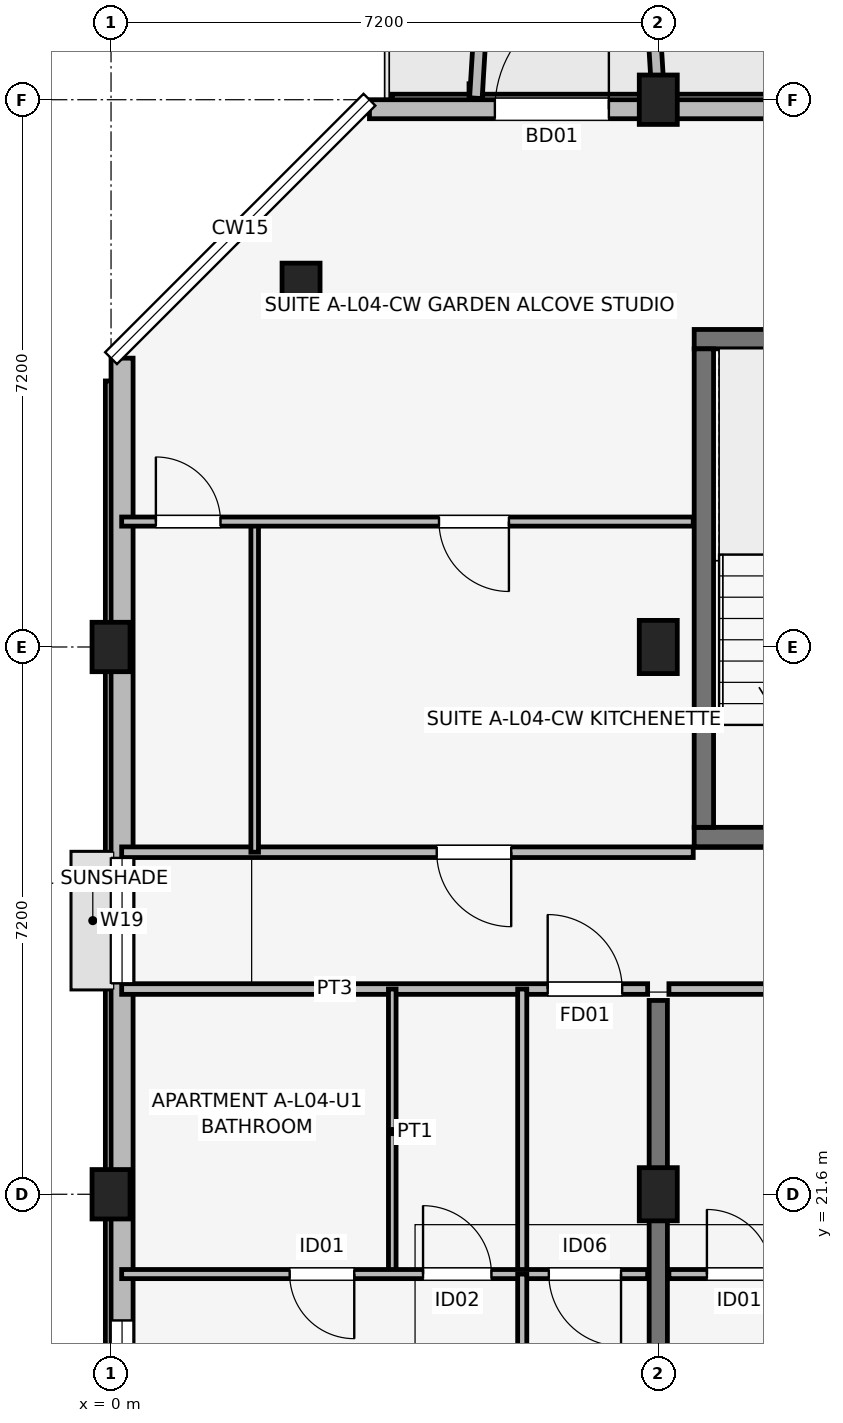
"""IFC4 building model, lengths in metres.
Left out: names, types, materials, properties, quantities, classifications, styles, units other than length and angle.
Written with IfcOpenShell. Run it as: python <this file> out.ifc"""

import sys

from ifc_helpers import new_model, si_unit, direction, frame, frame_2d, origin, origin_2d, place, context, subcontext, project, spatial, rectangle, extrude, element, fill, save


model = new_model("IFC4")
c1 = context("Model", 3, precision=1e-05, world=origin(), true_north=direction((0.0, 1.0)))
c2 = subcontext(c1, "Body", "Model", "MODEL_VIEW")
j1 = project(units=[si_unit("LENGTHUNIT", "METRE"), si_unit("PLANEANGLEUNIT", "RADIAN")], contexts=[c1])
p1 = place(None, origin())
s1 = spatial("IfcSite", under=j1, at=p1, CompositionType="ELEMENT")
p2 = place(p1, origin())
s2 = spatial("IfcBuilding", under=s1, at=p2, CompositionType="ELEMENT")
p3 = place(p2, frame((0.0, 0.0, 15.0)))
s3 = spatial("IfcBuildingStorey", under=s2, at=p3, CompositionType="ELEMENT", Elevation=15.0)
for number, where, z_axis, x_axis in (
    (1, (0.0, 21.6, 0.0), (0.0, 0.0, 1.0), (1.0, 0.0, 0.0)),
    (2, (0.0, 28.8, 0.0), (0.0, 0.0, 1.0), (1.0, 0.0, 0.0)),
):
    element("IfcColumn", number, at=place(p3, frame(where, z_axis=z_axis, x_axis=x_axis)), inside=s3, PredefinedType="COLUMN", context=c2, shape_type="SweptSolid", body=[
        extrude(rectangle(XDim=0.5, YDim=0.65, at=origin_2d()), origin(), (0.0, 0.0, 1.0), 3.15),
    ])
for number, where, z_axis, x_axis in (
    (3, (2.5, 33.5, 0.0), (0.0, 0.0, 1.0), (1.0, 0.0, 0.0)),
    (4, (7.2, 21.6, 0.0), (0.0, 0.0, 1.0), (1.0, 0.0, 0.0)),
    (5, (7.2, 28.8, 0.0), (0.0, 0.0, 1.0), (1.0, 0.0, 0.0)),
):
    element("IfcColumn", number, at=place(p3, frame(where, z_axis=z_axis, x_axis=x_axis)), inside=s3, PredefinedType="COLUMN", context=c2, shape_type="SweptSolid", body=[
        extrude(rectangle(XDim=0.5, YDim=0.7, at=origin_2d()), origin(), (0.0, 0.0, 1.0), 3.15),
    ])
p4 = place(p3, frame((7.2, 36.0, 0.0), z_axis=(0.0, 0.0, 1.0), x_axis=(1.0, 0.0, 0.0)))
e6 = element("IfcColumn", 6, at=p4, inside=s3, PredefinedType="COLUMN", context=c2, shape_type="SweptSolid", body=[
    extrude(rectangle(XDim=0.5, YDim=0.65, at=origin_2d()), origin(), (0.0, 0.0, 1.0), 3.15),
])
p5 = place(p3, frame((7.673, 26.3, 0.0), z_axis=(0.0, 0.0, 1.0), x_axis=(1.0, 0.0, 0.0)))
e7 = element("IfcWall", 7, at=p5, inside=s3, PredefinedType="SHEAR", context=c2, shape_type="SweptSolid", body=[
    extrude(rectangle(XDim=3.305, YDim=0.255, at=frame_2d((1.652, 0.0))), origin(), (0.0, 0.0, 1.0), 3.15),
])
p6 = place(p5, frame((2.177, 0.0, 0.0), z_axis=(0.0, 0.0, 1.0), x_axis=(-1.0, 0.0, 0.0)))
e8 = element("IfcOpeningElement", 8, at=p6, cuts=e7, PredefinedType="OPENING", context=c2, shape_type="SweptSolid", body=[
    extrude(rectangle(XDim=1.05, YDim=2.12, at=frame_2d((0.525, 1.06))), frame((0.0, 0.137, 0.0), z_axis=(0.0, -1.0, 0.0), x_axis=(1.0, 0.0, 0.0)), (0.0, 0.0, 1.0), 0.275),
])
p7 = place(p3, frame((7.673, 32.85, 0.0), z_axis=(0.0, 0.0, 1.0), x_axis=(1.0, 0.0, 0.0)))
e9 = element("IfcWall", 9, at=p7, inside=s3, PredefinedType="SHEAR", context=c2, shape_type="SweptSolid", body=[
    extrude(rectangle(XDim=3.305, YDim=0.255, at=frame_2d((1.652, 0.0))), origin(), (0.0, 0.0, 1.0), 3.15),
])
p8 = place(p3, frame((7.8, 26.427, 0.0), z_axis=(0.0, 0.0, 1.0), x_axis=(0.0, 1.0, 0.0)))
e10 = element("IfcWall", 10, at=p8, inside=s3, PredefinedType="SHEAR", context=c2, shape_type="SweptSolid", body=[
    extrude(rectangle(XDim=6.295, YDim=0.255, at=frame_2d((3.147, 0.0))), origin(), (0.0, 0.0, 1.0), 3.15),
])
p9 = place(p3, frame((7.2, 14.75, 0.0), z_axis=(0.0, 0.0, 1.0), x_axis=(0.0, 1.0, 0.0)))
e11 = element("IfcWall", 11, at=p9, inside=s3, PredefinedType="SHEAR", context=c2, shape_type="SweptSolid", body=[
    extrude(rectangle(XDim=9.4, YDim=0.24, at=frame_2d((4.7, 0.0))), origin(), (0.0, 0.0, 1.0), 3.15),
])
p10 = place(p3, frame((32.6, 35.875, 0.0), z_axis=(0.0, 0.0, 1.0), x_axis=(-1.0, 0.0, 0.0)))
e12 = element("IfcWall", 12, at=p10, inside=s3, PredefinedType="SOLIDWALL", context=c2, shape_type="SweptSolid", body=[
    extrude(rectangle(XDim=29.2, YDim=0.25, at=frame_2d((14.6, 0.0))), origin(), (0.0, 0.0, 1.0), 2.43),
])
p11 = place(p10, frame((27.55, 0.0, 0.0), z_axis=(0.0, 0.0, 1.0), x_axis=(-1.0, 0.0, 0.0)))
e13 = element("IfcOpeningElement", 13, at=p11, cuts=e12, PredefinedType="OPENING", context=c2, shape_type="SweptSolid", body=[
    extrude(rectangle(XDim=1.5, YDim=2.15, at=frame_2d((0.75, 1.075))), frame((0.0, 0.135, 0.0), z_axis=(0.0, -1.0, 0.0), x_axis=(1.0, 0.0, 0.0)), (0.0, 0.0, 1.0), 0.27),
])
p12 = place(p10, frame((3.15, 0.0, 0.0), z_axis=(0.0, 0.0, 1.0), x_axis=(-1.0, 0.0, 0.0)))
e14 = element("IfcOpeningElement", 14, at=p12, cuts=e12, PredefinedType="OPENING", context=c2, shape_type="SweptSolid", body=[
    extrude(rectangle(XDim=1.5, YDim=2.15, at=frame_2d((0.75, 1.075))), frame((0.0, 0.135, 0.0), z_axis=(0.0, -1.0, 0.0), x_axis=(1.0, 0.0, 0.0)), (0.0, 0.0, 1.0), 0.27),
])
p13 = place(p10, frame((14.15, 0.0, 0.5)))
e15 = element("IfcOpeningElement", 15, at=p13, cuts=e12, PredefinedType="OPENING", context=c2, shape_type="SweptSolid", body=[
    extrude(rectangle(XDim=0.9, YDim=1.8, at=frame_2d((0.45, 0.9))), frame((0.0, 0.135, 0.0), z_axis=(0.0, -1.0, 0.0), x_axis=(1.0, 0.0, 0.0)), (0.0, 0.0, 1.0), 0.27),
])
p14 = place(p10, frame((8.725, 0.0, 0.7)))
e16 = element("IfcOpeningElement", 16, at=p14, cuts=e12, PredefinedType="OPENING", context=c2, shape_type="SweptSolid", body=[
    extrude(rectangle(XDim=1.86, YDim=1.6, at=frame_2d((0.93, 0.8))), frame((0.0, 0.135, 0.0), z_axis=(0.0, -1.0, 0.0), x_axis=(1.0, 0.0, 0.0)), (0.0, 0.0, 1.0), 0.27),
])
p15 = place(p10, frame((18.755, 0.0, 0.7)))
e17 = element("IfcOpeningElement", 17, at=p15, cuts=e12, PredefinedType="OPENING", context=c2, shape_type="SweptSolid", body=[
    extrude(rectangle(XDim=1.58, YDim=1.6, at=frame_2d((0.79, 0.8))), frame((0.0, 0.135, 0.0), z_axis=(0.0, -1.0, 0.0), x_axis=(1.0, 0.0, 0.0)), (0.0, 0.0, 1.0), 0.27),
])
p16 = place(p3, frame((0.145, 32.6, 0.0), z_axis=(0.0, 0.0, 1.0), x_axis=(0.0, -1.0, 0.0)))
e18 = element("IfcWall", 18, at=p16, inside=s3, PredefinedType="SOLIDWALL", context=c2, shape_type="SweptSolid", body=[
    extrude(rectangle(XDim=14.8, YDim=0.29, at=frame_2d((7.4, 0.0))), origin(), (0.0, 0.0, 1.0), 2.38),
])
p17 = place(p16, frame((6.575, 0.0, 1.05)))
e19 = element("IfcOpeningElement", 19, at=p17, cuts=e18, PredefinedType="OPENING", context=c2, shape_type="SweptSolid", body=[
    extrude(rectangle(XDim=1.65, YDim=1.15, at=frame_2d((0.825, 0.575))), frame((0.0, 0.155, 0.0), z_axis=(0.0, -1.0, 0.0), x_axis=(1.0, 0.0, 0.0)), (0.0, 0.0, 1.0), 0.31),
])
p18 = place(p16, frame((12.66, 0.0, 0.72)))
e20 = element("IfcOpeningElement", 20, at=p18, cuts=e18, PredefinedType="OPENING", context=c2, shape_type="SweptSolid", body=[
    extrude(rectangle(XDim=1.3, YDim=1.55, at=frame_2d((0.65, 0.775))), frame((0.0, 0.155, 0.0), z_axis=(0.0, -1.0, 0.0), x_axis=(1.0, 0.0, 0.0)), (0.0, 0.0, 1.0), 0.31),
])
for number, where, z_axis, x_axis in (
    (21, (4.8, 36.02, 0.0), (0.0, 0.0, 1.0), (0.061, 0.998, 0.0)),
    (22, (7.2, 36.02, 0.0), (0.0, 0.0, 1.0), (-0.061, 0.998, 0.0)),
):
    element("IfcWall", number, at=place(p3, frame(where, z_axis=z_axis, x_axis=x_axis)), inside=s3, PredefinedType="ELEMENTEDWALL", context=c2, shape_type="SweptSolid", body=[
        extrude(rectangle(XDim=1.964, YDim=0.165, at=frame_2d((0.982, 0.0))), origin(), (0.0, 0.0, 1.0), 2.95),
    ])
p19 = place(p3, frame((0.14, 24.3, 0.0), z_axis=(0.0, 0.0, 1.0), x_axis=(1.0, 0.0, 0.0)))
e23 = element("IfcWall", 23, at=p19, inside=s3, PredefinedType="PARTITIONING", context=c2, shape_type="SweptSolid", body=[
    extrude(rectangle(XDim=6.92, YDim=0.14, at=frame_2d((3.46, 0.0))), origin(), (0.0, 0.0, 1.0), 2.38),
])
p20 = place(p19, frame((5.605, 0.0, 0.0)))
e24 = element("IfcOpeningElement", 24, at=p20, cuts=e23, PredefinedType="OPENING", context=c2, shape_type="SweptSolid", body=[
    extrude(rectangle(XDim=0.98, YDim=2.1, at=frame_2d((0.49, 1.05))), frame((0.0, 0.08, 0.0), z_axis=(0.0, -1.0, 0.0), x_axis=(1.0, 0.0, 0.0)), (0.0, 0.0, 1.0), 0.16),
])
p21 = place(p3, frame((3.7, 20.55, 0.0), z_axis=(0.0, 0.0, 1.0), x_axis=(0.0, 1.0, 0.0)))
e25 = element("IfcWall", 25, at=p21, inside=s3, PredefinedType="PARTITIONING", context=c2, shape_type="SweptSolid", body=[
    extrude(rectangle(XDim=3.75, YDim=0.1, at=frame_2d((1.875, 0.0))), origin(), (0.0, 0.0, 1.0), 2.375),
])
p22 = place(p3, frame((5.41, 20.55, 0.0), z_axis=(0.0, 0.0, 1.0), x_axis=(0.0, 1.0, 0.0)))
e26 = element("IfcWall", 26, at=p22, inside=s3, PredefinedType="PARTITIONING", context=c2, shape_type="SweptSolid", body=[
    extrude(rectangle(XDim=3.75, YDim=0.12, at=frame_2d((1.875, 0.0))), origin(), (0.0, 0.0, 1.0), 2.375),
])
p23 = place(p3, frame((0.14, 20.55, 0.0), z_axis=(0.0, 0.0, 1.0), x_axis=(1.0, 0.0, 0.0)))
e27 = element("IfcWall", 27, at=p23, inside=s3, PredefinedType="PARTITIONING", context=c2, shape_type="SweptSolid", body=[
    extrude(rectangle(XDim=6.92, YDim=0.12, at=frame_2d((3.46, 0.0))), origin(), (0.0, 0.0, 1.0), 2.38),
])
p24 = place(p23, frame((3.06, 0.0, 0.0), z_axis=(0.0, 0.0, 1.0), x_axis=(-1.0, 0.0, 0.0)))
e28 = element("IfcOpeningElement", 28, at=p24, cuts=e27, PredefinedType="OPENING", context=c2, shape_type="SweptSolid", body=[
    extrude(rectangle(XDim=0.85, YDim=2.08, at=frame_2d((0.425, 1.04))), frame((0.0, 0.07, 0.0), z_axis=(0.0, -1.0, 0.0), x_axis=(1.0, 0.0, 0.0)), (0.0, 0.0, 1.0), 0.14),
])
p25 = place(p23, frame((3.965, 0.0, 0.0)))
e29 = element("IfcOpeningElement", 29, at=p25, cuts=e27, PredefinedType="OPENING", context=c2, shape_type="SweptSolid", body=[
    extrude(rectangle(XDim=0.9, YDim=2.08, at=frame_2d((0.45, 1.04))), frame((0.0, 0.07, 0.0), z_axis=(0.0, -1.0, 0.0), x_axis=(1.0, 0.0, 0.0)), (0.0, 0.0, 1.0), 0.14),
])
p26 = place(p23, frame((6.57, 0.0, 0.0), z_axis=(0.0, 0.0, 1.0), x_axis=(-1.0, 0.0, 0.0)))
e30 = element("IfcOpeningElement", 30, at=p26, cuts=e27, PredefinedType="OPENING", context=c2, shape_type="SweptSolid", body=[
    extrude(rectangle(XDim=0.95, YDim=2.08, at=frame_2d((0.475, 1.04))), frame((0.0, 0.07, 0.0), z_axis=(0.0, -1.0, 0.0), x_axis=(1.0, 0.0, 0.0)), (0.0, 0.0, 1.0), 0.14),
])
p27 = place(p3, frame((5.41, 14.7, 0.0), z_axis=(0.0, 0.0, 1.0), x_axis=(0.0, 1.0, 0.0)))
e31 = element("IfcWall", 31, at=p27, inside=s3, PredefinedType="PARTITIONING", context=c2, shape_type="SweptSolid", body=[
    extrude(rectangle(XDim=5.85, YDim=0.12, at=frame_2d((2.925, 0.0))), origin(), (0.0, 0.0, 1.0), 2.38),
])
p28 = place(p27, frame((2.475, 0.0, 0.0)))
e32 = element("IfcOpeningElement", 32, at=p28, cuts=e31, PredefinedType="OPENING", context=c2, shape_type="SweptSolid", body=[
    extrude(rectangle(XDim=0.9, YDim=2.08, at=frame_2d((0.45, 1.04))), frame((0.0, 0.07, 0.0), z_axis=(0.0, -1.0, 0.0), x_axis=(1.0, 0.0, 0.0)), (0.0, 0.0, 1.0), 0.14),
])
p29 = place(p3, frame((7.34, 24.3, 0.0), z_axis=(0.0, 0.0, 1.0), x_axis=(1.0, 0.0, 0.0)))
e33 = element("IfcWall", 33, at=p29, inside=s3, PredefinedType="PARTITIONING", context=c2, shape_type="SweptSolid", body=[
    extrude(rectangle(XDim=6.92, YDim=0.14, at=frame_2d((3.46, 0.0))), origin(), (0.0, 0.0, 1.0), 2.38),
])
p30 = place(p29, frame((5.85, 0.0, 0.0), z_axis=(0.0, 0.0, 1.0), x_axis=(-1.0, 0.0, 0.0)))
e34 = element("IfcOpeningElement", 34, at=p30, cuts=e33, PredefinedType="OPENING", context=c2, shape_type="SweptSolid", body=[
    extrude(rectangle(XDim=0.98, YDim=2.1, at=frame_2d((0.49, 1.05))), frame((0.0, 0.08, 0.0), z_axis=(0.0, -1.0, 0.0), x_axis=(1.0, 0.0, 0.0)), (0.0, 0.0, 1.0), 0.16),
])
p31 = place(p3, frame((7.34, 20.55, 0.0), z_axis=(0.0, 0.0, 1.0), x_axis=(1.0, 0.0, 0.0)))
e35 = element("IfcWall", 35, at=p31, inside=s3, PredefinedType="PARTITIONING", context=c2, shape_type="SweptSolid", body=[
    extrude(rectangle(XDim=6.92, YDim=0.12, at=frame_2d((3.46, 0.0))), origin(), (0.0, 0.0, 1.0), 2.38),
])
p32 = place(p31, frame((0.5, 0.0, 0.0)))
e36 = element("IfcOpeningElement", 36, at=p32, cuts=e35, PredefinedType="OPENING", context=c2, shape_type="SweptSolid", body=[
    extrude(rectangle(XDim=0.85, YDim=2.08, at=frame_2d((0.425, 1.04))), frame((0.0, 0.07, 0.0), z_axis=(0.0, -1.0, 0.0), x_axis=(1.0, 0.0, 0.0)), (0.0, 0.0, 1.0), 0.14),
])
p33 = place(p31, frame((3.275, 0.0, 0.0), z_axis=(0.0, 0.0, 1.0), x_axis=(-1.0, 0.0, 0.0)))
e37 = element("IfcOpeningElement", 37, at=p33, cuts=e35, PredefinedType="OPENING", context=c2, shape_type="SweptSolid", body=[
    extrude(rectangle(XDim=0.9, YDim=2.08, at=frame_2d((0.45, 1.04))), frame((0.0, 0.07, 0.0), z_axis=(0.0, -1.0, 0.0), x_axis=(1.0, 0.0, 0.0)), (0.0, 0.0, 1.0), 0.14),
])
p34 = place(p31, frame((4.885, 0.0, 0.0)))
e38 = element("IfcOpeningElement", 38, at=p34, cuts=e35, PredefinedType="OPENING", context=c2, shape_type="SweptSolid", body=[
    extrude(rectangle(XDim=0.95, YDim=2.08, at=frame_2d((0.475, 1.04))), frame((0.0, 0.07, 0.0), z_axis=(0.0, -1.0, 0.0), x_axis=(1.0, 0.0, 0.0)), (0.0, 0.0, 1.0), 0.14),
])
p35 = place(p3, frame((0.14, 26.1, 0.0), z_axis=(0.0, 0.0, 1.0), x_axis=(1.0, 0.0, 0.0)))
e39 = element("IfcWall", 39, at=p35, inside=s3, PredefinedType="PARTITIONING", context=c2, shape_type="SweptSolid", body=[
    extrude(rectangle(XDim=7.52, YDim=0.14, at=frame_2d((3.76, 0.0))), origin(), (0.0, 0.0, 1.0), 2.38),
])
p36 = place(p35, frame((5.125, 0.0, 0.0), z_axis=(0.0, 0.0, 1.0), x_axis=(-1.0, 0.0, 0.0)))
e40 = element("IfcOpeningElement", 40, at=p36, cuts=e39, PredefinedType="OPENING", context=c2, shape_type="SweptSolid", body=[
    extrude(rectangle(XDim=0.98, YDim=2.1, at=frame_2d((0.49, 1.05))), frame((0.0, 0.08, 0.0), z_axis=(0.0, -1.0, 0.0), x_axis=(1.0, 0.0, 0.0)), (0.0, 0.0, 1.0), 0.16),
])
p37 = place(p3, frame((1.89, 26.1, 0.0), z_axis=(0.0, 0.0, 1.0), x_axis=(0.0, 1.0, 0.0)))
e41 = element("IfcWall", 41, at=p37, inside=s3, PredefinedType="PARTITIONING", context=c2, shape_type="SweptSolid", body=[
    extrude(rectangle(XDim=4.35, YDim=0.1, at=frame_2d((2.175, 0.0))), origin(), (0.0, 0.0, 1.0), 2.375),
])
p38 = place(p3, frame((0.14, 30.45, 0.0), z_axis=(0.0, 0.0, 1.0), x_axis=(1.0, 0.0, 0.0)))
e42 = element("IfcWall", 42, at=p38, inside=s3, PredefinedType="PARTITIONING", context=c2, shape_type="SweptSolid", body=[
    extrude(rectangle(XDim=7.52, YDim=0.12, at=frame_2d((3.76, 0.0))), origin(), (0.0, 0.0, 1.0), 2.38),
])
p39 = place(p38, frame((0.45, 0.0, 0.0)))
e43 = element("IfcOpeningElement", 43, at=p39, cuts=e42, PredefinedType="OPENING", context=c2, shape_type="SweptSolid", body=[
    extrude(rectangle(XDim=0.85, YDim=2.08, at=frame_2d((0.425, 1.04))), frame((0.0, 0.07, 0.0), z_axis=(0.0, -1.0, 0.0), x_axis=(1.0, 0.0, 0.0)), (0.0, 0.0, 1.0), 0.14),
])
p40 = place(p38, frame((5.095, 0.0, 0.0), z_axis=(0.0, 0.0, 1.0), x_axis=(-1.0, 0.0, 0.0)))
e44 = element("IfcOpeningElement", 44, at=p40, cuts=e42, PredefinedType="OPENING", context=c2, shape_type="SweptSolid", body=[
    extrude(rectangle(XDim=0.92, YDim=2.08, at=frame_2d((0.46, 1.04))), frame((0.0, 0.07, 0.0), z_axis=(0.0, -1.0, 0.0), x_axis=(1.0, 0.0, 0.0)), (0.0, 0.0, 1.0), 0.14),
])
p41 = place(p11, origin())
e45 = element("IfcDoor", 45, at=p41, inside=s3, OperationType="SINGLE_SWING_LEFT", PredefinedType="DOOR", context=c2, shape_type="SweptSolid", body=[
    extrude(rectangle(XDim=1.5, YDim=2.15, at=frame_2d((0.75, 1.075))), frame((0.0, 0.025, 0.0), z_axis=(0.0, -1.0, 0.0), x_axis=(1.0, 0.0, 0.0)), (0.0, 0.0, 1.0), 0.05),
])
fill(e13, e45)
p42 = place(p17, origin())
e46 = element("IfcWindow", 46, at=p42, inside=s3, PartitioningType="SINGLE_PANEL", PredefinedType="WINDOW", context=c2, shape_type="SweptSolid", body=[
    extrude(rectangle(XDim=1.65, YDim=1.15, at=frame_2d((0.825, 0.575))), frame((0.0, 0.03, 0.0), z_axis=(0.0, -1.0, 0.0), x_axis=(1.0, 0.0, 0.0)), (0.0, 0.0, 1.0), 0.06),
])
fill(e19, e46)
p43 = place(p18, origin())
e47 = element("IfcWindow", 47, at=p43, inside=s3, PartitioningType="SINGLE_PANEL", PredefinedType="WINDOW", context=c2, shape_type="SweptSolid", body=[
    extrude(rectangle(XDim=1.3, YDim=1.55, at=frame_2d((0.65, 0.775))), frame((0.0, 0.03, 0.0), z_axis=(0.0, -1.0, 0.0), x_axis=(1.0, 0.0, 0.0)), (0.0, 0.0, 1.0), 0.06),
])
fill(e20, e47)
p44 = place(p20, origin())
e48 = element("IfcDoor", 48, at=p44, inside=s3, OperationType="SINGLE_SWING_LEFT", PredefinedType="DOOR", context=c2, shape_type="SweptSolid", body=[
    extrude(rectangle(XDim=0.98, YDim=2.1, at=frame_2d((0.49, 1.05))), frame((0.0, 0.025, 0.0), z_axis=(0.0, -1.0, 0.0), x_axis=(1.0, 0.0, 0.0)), (0.0, 0.0, 1.0), 0.05),
])
fill(e24, e48)
p45 = place(p24, origin())
e49 = element("IfcDoor", 49, at=p45, inside=s3, OperationType="SINGLE_SWING_RIGHT", PredefinedType="DOOR", context=c2, shape_type="SweptSolid", body=[
    extrude(rectangle(XDim=0.85, YDim=2.08, at=frame_2d((0.425, 1.04))), frame((0.0, 0.025, 0.0), z_axis=(0.0, -1.0, 0.0), x_axis=(1.0, 0.0, 0.0)), (0.0, 0.0, 1.0), 0.05),
])
fill(e28, e49)
p46 = place(p25, origin())
e50 = element("IfcDoor", 50, at=p46, inside=s3, OperationType="SINGLE_SWING_LEFT", PredefinedType="DOOR", context=c2, shape_type="SweptSolid", body=[
    extrude(rectangle(XDim=0.9, YDim=2.08, at=frame_2d((0.45, 1.04))), frame((0.0, 0.025, 0.0), z_axis=(0.0, -1.0, 0.0), x_axis=(1.0, 0.0, 0.0)), (0.0, 0.0, 1.0), 0.05),
])
fill(e29, e50)
p47 = place(p26, origin())
e51 = element("IfcDoor", 51, at=p47, inside=s3, OperationType="SINGLE_SWING_RIGHT", PredefinedType="DOOR", context=c2, shape_type="SweptSolid", body=[
    extrude(rectangle(XDim=0.95, YDim=2.08, at=frame_2d((0.475, 1.04))), frame((0.0, 0.025, 0.0), z_axis=(0.0, -1.0, 0.0), x_axis=(1.0, 0.0, 0.0)), (0.0, 0.0, 1.0), 0.05),
])
fill(e30, e51)
p48 = place(p32, origin())
e52 = element("IfcDoor", 52, at=p48, inside=s3, OperationType="SINGLE_SWING_LEFT", PredefinedType="DOOR", context=c2, shape_type="SweptSolid", body=[
    extrude(rectangle(XDim=0.85, YDim=2.08, at=frame_2d((0.425, 1.04))), frame((0.0, 0.025, 0.0), z_axis=(0.0, -1.0, 0.0), x_axis=(1.0, 0.0, 0.0)), (0.0, 0.0, 1.0), 0.05),
])
fill(e36, e52)
p49 = place(p36, origin())
e53 = element("IfcDoor", 53, at=p49, inside=s3, OperationType="SINGLE_SWING_RIGHT", PredefinedType="DOOR", context=c2, shape_type="SweptSolid", body=[
    extrude(rectangle(XDim=0.98, YDim=2.1, at=frame_2d((0.49, 1.05))), frame((0.0, 0.025, 0.0), z_axis=(0.0, -1.0, 0.0), x_axis=(1.0, 0.0, 0.0)), (0.0, 0.0, 1.0), 0.05),
])
fill(e40, e53)
p50 = place(p39, origin())
e54 = element("IfcDoor", 54, at=p50, inside=s3, OperationType="SINGLE_SWING_LEFT", PredefinedType="DOOR", context=c2, shape_type="SweptSolid", body=[
    extrude(rectangle(XDim=0.85, YDim=2.08, at=frame_2d((0.425, 1.04))), frame((0.0, 0.025, 0.0), z_axis=(0.0, -1.0, 0.0), x_axis=(1.0, 0.0, 0.0)), (0.0, 0.0, 1.0), 0.05),
])
fill(e43, e54)
p51 = place(p40, origin())
e55 = element("IfcDoor", 55, at=p51, inside=s3, OperationType="SINGLE_SWING_RIGHT", PredefinedType="DOOR", context=c2, shape_type="SweptSolid", body=[
    extrude(rectangle(XDim=0.92, YDim=2.08, at=frame_2d((0.46, 1.04))), frame((0.0, 0.025, 0.0), z_axis=(0.0, -1.0, 0.0), x_axis=(1.0, 0.0, 0.0)), (0.0, 0.0, 1.0), 0.05),
])
fill(e44, e55)
save(model, sys.argv[1])
